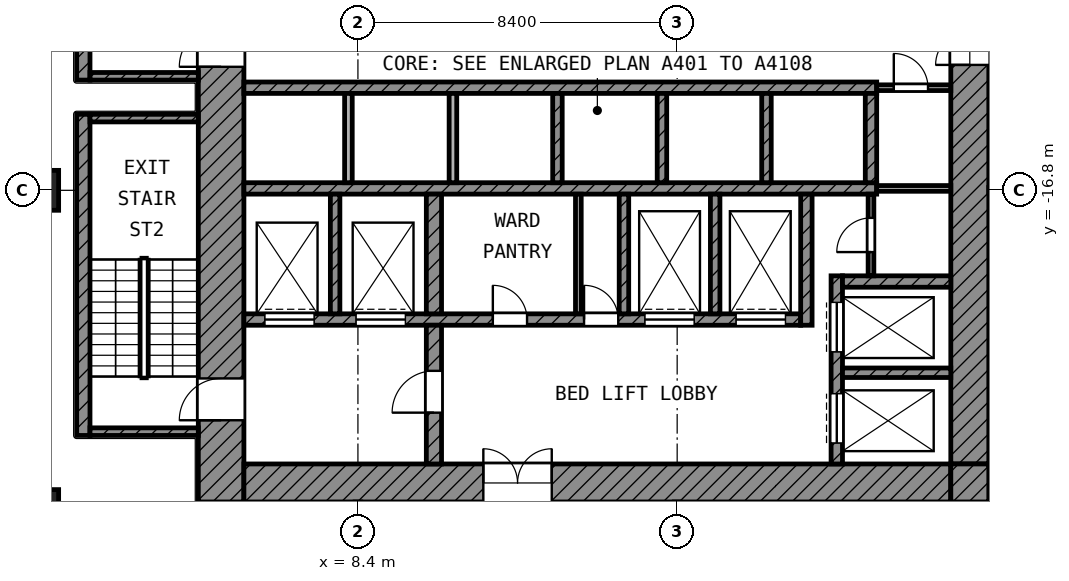
"""IFC4 building model, lengths in metres.
Left out: names, types, materials, properties, quantities, classifications, styles, units other than length and angle.
Written with IfcOpenShell. Run it as: python <this file> out.ifc"""

import sys

from ifc_helpers import new_model, si_unit, direction, frame, frame_2d, origin, origin_2d, place, context, subcontext, project, spatial, rectangle, extrude, element, fill, save


model = new_model("IFC4")
c1 = context("Model", 3, precision=1e-05, world=origin(), true_north=direction((0.0, 1.0)))
c2 = subcontext(c1, "Body", "Model", "MODEL_VIEW")
j1 = project(units=[si_unit("LENGTHUNIT", "METRE"), si_unit("PLANEANGLEUNIT", "RADIAN")], contexts=[c1])
p1 = place(None, origin())
s1 = spatial("IfcSite", under=j1, at=p1, CompositionType="ELEMENT")
p2 = place(p1, origin())
s2 = spatial("IfcBuilding", under=s1, at=p2, CompositionType="ELEMENT")
p3 = place(p2, frame((0.0, 0.0, 136.6)))
s3 = spatial("IfcBuildingStorey", under=s2, at=p3, CompositionType="ELEMENT", Elevation=136.6)
for number, where, z_axis, x_axis in (
    (1, (0.0, -16.8, 0.0), (0.0, 0.0, 1.0), (1.0, 0.0, 0.0)),
    (2, (0.0, -25.2, 0.0), (0.0, 0.0, 1.0), (1.0, 0.0, 0.0)),
):
    element("IfcColumn", number, at=place(p3, frame(where, z_axis=z_axis, x_axis=x_axis)), inside=s3, PredefinedType="COLUMN", context=c2, shape_type="SweptSolid", body=[
        extrude(rectangle(XDim=1.05, YDim=1.05, at=origin_2d()), origin(), (0.0, 0.0, 1.0), 4.2),
    ])
p4 = place(p3, frame((4.8, -25.0, 0.0), z_axis=(0.0, 0.0, 1.0), x_axis=(0.0, 1.0, 0.0)))
e3 = element("IfcWall", 3, at=p4, inside=s3, PredefinedType="SHEAR", context=c2, shape_type="SweptSolid", body=[
    extrude(rectangle(XDim=19.6, YDim=1.2, at=frame_2d((9.8, 0.0))), origin(), (0.0, 0.0, 1.0), 3.6),
])
p5 = place(p4, frame((11.45, 0.0, 0.0)))
e4 = element("IfcOpeningElement", 4, at=p5, cuts=e3, PredefinedType="OPENING", context=c2, shape_type="SweptSolid", body=[
    extrude(rectangle(XDim=1.1, YDim=2.1, at=frame_2d((0.55, 1.05))), frame((0.0, 0.61, 0.0), z_axis=(0.0, -1.0, 0.0), x_axis=(1.0, 0.0, 0.0)), (0.0, 0.0, 1.0), 1.22),
])
p6 = place(p4, frame((2.15, 0.0, 0.0)))
e5 = element("IfcOpeningElement", 5, at=p6, cuts=e3, PredefinedType="OPENING", context=c2, shape_type="SweptSolid", body=[
    extrude(rectangle(XDim=1.1, YDim=2.1, at=frame_2d((0.55, 1.05))), frame((0.0, 0.61, 0.0), z_axis=(0.0, -1.0, 0.0), x_axis=(1.0, 0.0, 0.0)), (0.0, 0.0, 1.0), 1.22),
])
p7 = place(p3, frame((24.5, -24.0, 0.0), z_axis=(0.0, 0.0, 1.0), x_axis=(0.0, 1.0, 0.0)))
e6 = element("IfcWall", 6, at=p7, inside=s3, PredefinedType="SHEAR", context=c2, shape_type="SweptSolid", body=[
    extrude(rectangle(XDim=18.6, YDim=1.0, at=frame_2d((9.3, 0.0))), origin(), (0.0, 0.0, 1.0), 3.6),
])
p8 = place(p7, frame((10.5, 0.0, 0.0)))
e7 = element("IfcOpeningElement", 7, at=p8, cuts=e6, PredefinedType="OPENING", context=c2, shape_type="SweptSolid", body=[
    extrude(rectangle(XDim=1.8, YDim=2.1, at=frame_2d((0.9, 1.05))), frame((0.0, 0.51, 0.0), z_axis=(0.0, -1.0, 0.0), x_axis=(1.0, 0.0, 0.0)), (0.0, 0.0, 1.0), 1.02),
])
p9 = place(p3, frame((5.4, -24.5, 0.0), z_axis=(0.0, 0.0, 1.0), x_axis=(1.0, 0.0, 0.0)))
e8 = element("IfcWall", 8, at=p9, inside=s3, PredefinedType="SHEAR", context=c2, shape_type="SweptSolid", body=[
    extrude(rectangle(XDim=18.6, YDim=1.0, at=frame_2d((9.3, 0.0))), origin(), (0.0, 0.0, 1.0), 3.6),
])
p10 = place(p9, frame((6.3, 0.0, 0.0)))
e9 = element("IfcOpeningElement", 9, at=p10, cuts=e8, PredefinedType="OPENING", context=c2, shape_type="SweptSolid", body=[
    extrude(rectangle(XDim=1.8, YDim=2.1, at=frame_2d((0.9, 1.05))), frame((0.0, 0.51, 0.0), z_axis=(0.0, -1.0, 0.0), x_axis=(1.0, 0.0, 0.0)), (0.0, 0.0, 1.0), 1.02),
])
p11 = place(p3, frame((24.5, -25.0, 0.0), z_axis=(0.0, 0.0, 1.0), x_axis=(0.0, 1.0, 0.0)))
e10 = element("IfcWall", 10, at=p11, inside=s3, PredefinedType="SHEAR", context=c2, shape_type="SweptSolid", body=[
    extrude(rectangle(XDim=1.0, YDim=1.0, at=frame_2d((0.5, 0.0))), origin(), (0.0, 0.0, 1.0), 3.6),
])
for number, where, z_axis, x_axis in (
    (11, (5.4, -14.1, 0.0), (0.0, 0.0, 1.0), (1.0, 0.0, 0.0)),
    (12, (5.4, -16.75, 0.0), (0.0, 0.0, 1.0), (1.0, 0.0, 0.0)),
):
    element("IfcWall", number, at=place(p3, frame(where, z_axis=z_axis, x_axis=x_axis)), inside=s3, PredefinedType="SHEAR", context=c2, shape_type="SweptSolid", body=[
        extrude(rectangle(XDim=16.65, YDim=0.3, at=frame_2d((8.325, 0.0))), origin(), (0.0, 0.0, 1.0), 3.6),
    ])
p12 = place(p3, frame((5.4, -20.2, 0.0), z_axis=(0.0, 0.0, 1.0), x_axis=(1.0, 0.0, 0.0)))
e13 = element("IfcWall", 13, at=p12, inside=s3, PredefinedType="SHEAR", context=c2, shape_type="SweptSolid", body=[
    extrude(rectangle(XDim=14.65, YDim=0.3, at=frame_2d((7.325, 0.0))), origin(), (0.0, 0.0, 1.0), 3.6),
])
p13 = place(p12, frame((10.55, 0.0, 0.0)))
e14 = element("IfcOpeningElement", 14, at=p13, cuts=e13, PredefinedType="OPENING", context=c2, shape_type="SweptSolid", body=[
    extrude(rectangle(XDim=1.3, YDim=2.1, at=frame_2d((0.65, 1.05))), frame((0.0, 0.16, 0.0), z_axis=(0.0, -1.0, 0.0), x_axis=(1.0, 0.0, 0.0)), (0.0, 0.0, 1.0), 0.32),
])
p14 = place(p12, frame((12.95, 0.0, 0.0)))
e15 = element("IfcOpeningElement", 15, at=p14, cuts=e13, PredefinedType="OPENING", context=c2, shape_type="SweptSolid", body=[
    extrude(rectangle(XDim=1.3, YDim=2.1, at=frame_2d((0.65, 1.05))), frame((0.0, 0.16, 0.0), z_axis=(0.0, -1.0, 0.0), x_axis=(1.0, 0.0, 0.0)), (0.0, 0.0, 1.0), 0.32),
])
p15 = place(p12, frame((0.55, 0.0, 0.0)))
e16 = element("IfcOpeningElement", 16, at=p15, cuts=e13, PredefinedType="OPENING", context=c2, shape_type="SweptSolid", body=[
    extrude(rectangle(XDim=1.3, YDim=2.1, at=frame_2d((0.65, 1.05))), frame((0.0, 0.16, 0.0), z_axis=(0.0, -1.0, 0.0), x_axis=(1.0, 0.0, 0.0)), (0.0, 0.0, 1.0), 0.32),
])
p16 = place(p12, frame((2.95, 0.0, 0.0)))
e17 = element("IfcOpeningElement", 17, at=p16, cuts=e13, PredefinedType="OPENING", context=c2, shape_type="SweptSolid", body=[
    extrude(rectangle(XDim=1.3, YDim=2.1, at=frame_2d((0.65, 1.05))), frame((0.0, 0.16, 0.0), z_axis=(0.0, -1.0, 0.0), x_axis=(1.0, 0.0, 0.0)), (0.0, 0.0, 1.0), 0.32),
])
p17 = place(p12, frame((6.55, 0.0, 0.0)))
e18 = element("IfcOpeningElement", 18, at=p17, cuts=e13, PredefinedType="OPENING", context=c2, shape_type="SweptSolid", body=[
    extrude(rectangle(XDim=0.9, YDim=2.1, at=frame_2d((0.45, 1.05))), frame((0.0, 0.16, 0.0), z_axis=(0.0, -1.0, 0.0), x_axis=(1.0, 0.0, 0.0)), (0.0, 0.0, 1.0), 0.32),
])
p18 = place(p12, frame((8.95, 0.0, 0.0)))
e19 = element("IfcOpeningElement", 19, at=p18, cuts=e13, PredefinedType="OPENING", context=c2, shape_type="SweptSolid", body=[
    extrude(rectangle(XDim=0.9, YDim=2.1, at=frame_2d((0.45, 1.05))), frame((0.0, 0.16, 0.0), z_axis=(0.0, -1.0, 0.0), x_axis=(1.0, 0.0, 0.0)), (0.0, 0.0, 1.0), 0.32),
])
p19 = place(p3, frame((10.4, -24.0, 0.0), z_axis=(0.0, 0.0, 1.0), x_axis=(0.0, 1.0, 0.0)))
e20 = element("IfcWall", 20, at=p19, inside=s3, PredefinedType="SHEAR", context=c2, shape_type="SweptSolid", body=[
    extrude(rectangle(XDim=3.65, YDim=0.4, at=frame_2d((1.825, 0.0))), origin(), (0.0, 0.0, 1.0), 3.6),
])
p20 = place(p19, frame((1.35, 0.0, 0.0)))
e21 = element("IfcOpeningElement", 21, at=p20, cuts=e20, PredefinedType="OPENING", context=c2, shape_type="SweptSolid", body=[
    extrude(rectangle(XDim=1.1, YDim=2.1, at=frame_2d((0.55, 1.05))), frame((0.0, 0.21, 0.0), z_axis=(0.0, -1.0, 0.0), x_axis=(1.0, 0.0, 0.0)), (0.0, 0.0, 1.0), 0.42),
])
p21 = place(p3, frame((10.4, -20.05, 0.0), z_axis=(0.0, 0.0, 1.0), x_axis=(0.0, 1.0, 0.0)))
e22 = element("IfcWall", 22, at=p21, inside=s3, PredefinedType="SHEAR", context=c2, shape_type="SweptSolid", body=[
    extrude(rectangle(XDim=3.15, YDim=0.4, at=frame_2d((1.575, 0.0))), origin(), (0.0, 0.0, 1.0), 3.6),
])
p22 = place(p3, frame((20.2, -20.35, 0.0), z_axis=(0.0, 0.0, 1.0), x_axis=(0.0, 1.0, 0.0)))
e23 = element("IfcWall", 23, at=p22, inside=s3, PredefinedType="SHEAR", context=c2, shape_type="SweptSolid", body=[
    extrude(rectangle(XDim=3.45, YDim=0.3, at=frame_2d((1.725, 0.0))), origin(), (0.0, 0.0, 1.0), 3.6),
])
p23 = place(p3, frame((21.9, -16.6, 0.0), z_axis=(0.0, 0.0, 1.0), x_axis=(0.0, 1.0, 0.0)))
e24 = element("IfcWall", 24, at=p23, inside=s3, PredefinedType="SHEAR", context=c2, shape_type="SweptSolid", body=[
    extrude(rectangle(XDim=2.35, YDim=0.3, at=frame_2d((1.175, 0.0))), origin(), (0.0, 0.0, 1.0), 3.6),
])
p24 = place(p3, frame((21.15, -19.2, 0.0), z_axis=(0.0, 0.0, 1.0), x_axis=(1.0, 0.0, 0.0)))
e25 = element("IfcWall", 25, at=p24, inside=s3, PredefinedType="SHEAR", context=c2, shape_type="SweptSolid", body=[
    extrude(rectangle(XDim=2.85, YDim=0.3, at=frame_2d((1.425, 0.0))), origin(), (0.0, 0.0, 1.0), 3.6),
])
p25 = place(p3, frame((21.0, -24.0, 0.0), z_axis=(0.0, 0.0, 1.0), x_axis=(0.0, 1.0, 0.0)))
e26 = element("IfcWall", 26, at=p25, inside=s3, PredefinedType="SHEAR", context=c2, shape_type="SweptSolid", body=[
    extrude(rectangle(XDim=4.95, YDim=0.3, at=frame_2d((2.475, 0.0))), origin(), (0.0, 0.0, 1.0), 3.6),
])
p26 = place(p25, frame((2.95, 0.0, 0.0)))
e27 = element("IfcOpeningElement", 27, at=p26, cuts=e26, PredefinedType="OPENING", context=c2, shape_type="SweptSolid", body=[
    extrude(rectangle(XDim=1.3, YDim=2.1, at=frame_2d((0.65, 1.05))), frame((0.0, 0.16, 0.0), z_axis=(0.0, -1.0, 0.0), x_axis=(1.0, 0.0, 0.0)), (0.0, 0.0, 1.0), 0.32),
])
p27 = place(p25, frame((0.55, 0.0, 0.0)))
e28 = element("IfcOpeningElement", 28, at=p27, cuts=e26, PredefinedType="OPENING", context=c2, shape_type="SweptSolid", body=[
    extrude(rectangle(XDim=1.3, YDim=2.1, at=frame_2d((0.65, 1.05))), frame((0.0, 0.16, 0.0), z_axis=(0.0, -1.0, 0.0), x_axis=(1.0, 0.0, 0.0)), (0.0, 0.0, 1.0), 0.32),
])
p28 = place(p3, frame((21.15, -21.6, 0.0), z_axis=(0.0, 0.0, 1.0), x_axis=(1.0, 0.0, 0.0)))
e29 = element("IfcWall", 29, at=p28, inside=s3, PredefinedType="SHEAR", context=c2, shape_type="SweptSolid", body=[
    extrude(rectangle(XDim=2.85, YDim=0.25, at=frame_2d((1.425, 0.0))), origin(), (0.0, 0.0, 1.0), 3.6),
])
for number, where, z_axis, x_axis in (
    (30, (7.8, -20.05, 0.0), (0.0, 0.0, 1.0), (0.0, 1.0, 0.0)),
    (31, (15.4, -20.05, 0.0), (0.0, 0.0, 1.0), (0.0, 1.0, 0.0)),
    (32, (17.8, -20.05, 0.0), (0.0, 0.0, 1.0), (0.0, 1.0, 0.0)),
):
    element("IfcWall", number, at=place(p3, frame(where, z_axis=z_axis, x_axis=x_axis)), inside=s3, PredefinedType="SHEAR", context=c2, shape_type="SweptSolid", body=[
        extrude(rectangle(XDim=3.15, YDim=0.25, at=frame_2d((1.575, 0.0))), origin(), (0.0, 0.0, 1.0), 3.6),
    ])
for number, where, z_axis, x_axis in (
    (33, (8.15, -16.6, 0.0), (0.0, 0.0, 1.0), (0.0, 1.0, 0.0)),
    (34, (10.9, -16.6, 0.0), (0.0, 0.0, 1.0), (0.0, 1.0, 0.0)),
):
    element("IfcWall", number, at=place(p3, frame(where, z_axis=z_axis, x_axis=x_axis)), inside=s3, PredefinedType="PARTITIONING", context=c2, shape_type="SweptSolid", body=[
        extrude(rectangle(XDim=2.35, YDim=0.2, at=frame_2d((1.175, 0.0))), origin(), (0.0, 0.0, 1.0), 3.6),
    ])
for number, where, z_axis, x_axis in (
    (35, (13.65, -16.6, 0.0), (0.0, 0.0, 1.0), (0.0, 1.0, 0.0)),
    (36, (16.4, -16.6, 0.0), (0.0, 0.0, 1.0), (0.0, 1.0, 0.0)),
    (37, (19.15, -16.6, 0.0), (0.0, 0.0, 1.0), (0.0, 1.0, 0.0)),
):
    element("IfcWall", number, at=place(p3, frame(where, z_axis=z_axis, x_axis=x_axis)), inside=s3, PredefinedType="SHEAR", context=c2, shape_type="SweptSolid", body=[
        extrude(rectangle(XDim=2.35, YDim=0.25, at=frame_2d((1.175, 0.0))), origin(), (0.0, 0.0, 1.0), 3.6),
    ])
p29 = place(p3, frame((21.9, -19.05, 0.0), z_axis=(0.0, 0.0, 1.0), x_axis=(0.0, 1.0, 0.0)))
e38 = element("IfcWall", 38, at=p29, inside=s3, PredefinedType="PARTITIONING", context=c2, shape_type="SweptSolid", body=[
    extrude(rectangle(XDim=2.15, YDim=0.15, at=frame_2d((1.075, 0.0))), origin(), (0.0, 0.0, 1.0), 3.6),
])
p30 = place(p29, frame((0.625, 0.0, 0.0)))
e39 = element("IfcOpeningElement", 39, at=p30, cuts=e38, PredefinedType="OPENING", context=c2, shape_type="SweptSolid", body=[
    extrude(rectangle(XDim=0.9, YDim=2.1, at=frame_2d((0.45, 1.05))), frame((0.0, 0.085, 0.0), z_axis=(0.0, -1.0, 0.0), x_axis=(1.0, 0.0, 0.0)), (0.0, 0.0, 1.0), 0.17),
])
p31 = place(p3, frame((22.05, -16.75, 0.0), z_axis=(0.0, 0.0, 1.0), x_axis=(1.0, 0.0, 0.0)))
e40 = element("IfcWall", 40, at=p31, inside=s3, PredefinedType="PARTITIONING", context=c2, shape_type="SweptSolid", body=[
    extrude(rectangle(XDim=1.95, YDim=0.15, at=frame_2d((0.975, 0.0))), origin(), (0.0, 0.0, 1.0), 3.6),
])
p32 = place(p3, frame((22.05, -14.1, 0.0), z_axis=(0.0, 0.0, 1.0), x_axis=(1.0, 0.0, 0.0)))
e41 = element("IfcWall", 41, at=p32, inside=s3, PredefinedType="PARTITIONING", context=c2, shape_type="SweptSolid", body=[
    extrude(rectangle(XDim=1.95, YDim=0.15, at=frame_2d((0.975, 0.0))), origin(), (0.0, 0.0, 1.0), 3.6),
])
p33 = place(p32, frame((0.45, 0.0, 0.0)))
e42 = element("IfcOpeningElement", 42, at=p33, cuts=e41, PredefinedType="OPENING", context=c2, shape_type="SweptSolid", body=[
    extrude(rectangle(XDim=0.9, YDim=2.1, at=frame_2d((0.45, 1.05))), frame((0.0, 0.085, 0.0), z_axis=(0.0, -1.0, 0.0), x_axis=(1.0, 0.0, 0.0)), (0.0, 0.0, 1.0), 0.17),
])
p34 = place(p3, frame((14.2, -20.05, 0.0), z_axis=(0.0, 0.0, 1.0), x_axis=(0.0, 1.0, 0.0)))
e43 = element("IfcWall", 43, at=p34, inside=s3, PredefinedType="PARTITIONING", context=c2, shape_type="SweptSolid", body=[
    extrude(rectangle(XDim=3.15, YDim=0.15, at=frame_2d((1.575, 0.0))), origin(), (0.0, 0.0, 1.0), 3.6),
])
p35 = place(p3, frame((1.175, -13.9, 0.0), z_axis=(0.0, 0.0, 1.0), x_axis=(0.0, 1.0, 0.0)))
e44 = element("IfcWall", 44, at=p35, inside=s3, PredefinedType="SHEAR", context=c2, shape_type="SweptSolid", body=[
    extrude(rectangle(XDim=8.45, YDim=0.35, at=frame_2d((4.225, 0.0))), origin(), (0.0, 0.0, 1.0), 3.6),
])
p36 = place(p3, frame((1.35, -13.8, 0.0), z_axis=(0.0, 0.0, 1.0), x_axis=(1.0, 0.0, 0.0)))
e45 = element("IfcWall", 45, at=p36, inside=s3, PredefinedType="SHEAR", context=c2, shape_type="SweptSolid", body=[
    extrude(rectangle(XDim=2.85, YDim=0.2, at=frame_2d((1.425, 0.0))), origin(), (0.0, 0.0, 1.0), 3.6),
])
p37 = place(p3, frame((1.175, -23.25, 0.0), z_axis=(0.0, 0.0, 1.0), x_axis=(0.0, 1.0, 0.0)))
e46 = element("IfcWall", 46, at=p37, inside=s3, PredefinedType="SHEAR", context=c2, shape_type="SweptSolid", body=[
    extrude(rectangle(XDim=8.45, YDim=0.35, at=frame_2d((4.225, 0.0))), origin(), (0.0, 0.0, 1.0), 3.6),
])
for number, where, z_axis, x_axis in (
    (47, (1.35, -14.9, 0.0), (0.0, 0.0, 1.0), (1.0, 0.0, 0.0)),
    (48, (1.35, -23.15, 0.0), (0.0, 0.0, 1.0), (1.0, 0.0, 0.0)),
):
    element("IfcWall", number, at=place(p3, frame(where, z_axis=z_axis, x_axis=x_axis)), inside=s3, PredefinedType="SHEAR", context=c2, shape_type="SweptSolid", body=[
        extrude(rectangle(XDim=2.85, YDim=0.2, at=frame_2d((1.425, 0.0))), origin(), (0.0, 0.0, 1.0), 3.6),
    ])
p38 = place(p3, frame((8.4, -31.782, 0.0), z_axis=(0.0, 0.0, 1.0), x_axis=(0.0, 1.0, 0.0)))
e49 = element("IfcWall", 49, at=p38, inside=s3, PredefinedType="PARTITIONING", context=c2, shape_type="SweptSolid", body=[
    extrude(rectangle(XDim=6.782, YDim=0.15, at=frame_2d((3.391, 0.0))), origin(), (0.0, 0.0, 1.0), 3.6),
])
p39 = place(p38, frame((4.182, 0.0, 0.0)))
e50 = element("IfcOpeningElement", 50, at=p39, cuts=e49, PredefinedType="OPENING", context=c2, shape_type="SweptSolid", body=[
    extrude(rectangle(XDim=0.9, YDim=2.1, at=frame_2d((0.45, 1.05))), frame((0.0, 0.085, 0.0), z_axis=(0.0, -1.0, 0.0), x_axis=(1.0, 0.0, 0.0)), (0.0, 0.0, 1.0), 0.17),
])
p40 = place(p26, origin())
e51 = element("IfcDoor", 51, at=p40, inside=s3, OperationType="DOUBLE_DOOR_SLIDING", PredefinedType="DOOR", context=c2, shape_type="SweptSolid", body=[
    extrude(rectangle(XDim=1.3, YDim=2.1, at=frame_2d((0.65, 1.05))), frame((0.0, 0.025, 0.0), z_axis=(0.0, -1.0, 0.0), x_axis=(1.0, 0.0, 0.0)), (0.0, 0.0, 1.0), 0.05),
])
fill(e27, e51)
p41 = place(p27, origin())
e52 = element("IfcDoor", 52, at=p41, inside=s3, OperationType="DOUBLE_DOOR_SLIDING", PredefinedType="DOOR", context=c2, shape_type="SweptSolid", body=[
    extrude(rectangle(XDim=1.3, YDim=2.1, at=frame_2d((0.65, 1.05))), frame((0.0, 0.025, 0.0), z_axis=(0.0, -1.0, 0.0), x_axis=(1.0, 0.0, 0.0)), (0.0, 0.0, 1.0), 0.05),
])
fill(e28, e52)
p42 = place(p13, origin())
e53 = element("IfcDoor", 53, at=p42, inside=s3, OperationType="DOUBLE_DOOR_SLIDING", PredefinedType="DOOR", context=c2, shape_type="SweptSolid", body=[
    extrude(rectangle(XDim=1.3, YDim=2.1, at=frame_2d((0.65, 1.05))), frame((0.0, 0.025, 0.0), z_axis=(0.0, -1.0, 0.0), x_axis=(1.0, 0.0, 0.0)), (0.0, 0.0, 1.0), 0.05),
])
fill(e14, e53)
p43 = place(p14, origin())
e54 = element("IfcDoor", 54, at=p43, inside=s3, OperationType="DOUBLE_DOOR_SLIDING", PredefinedType="DOOR", context=c2, shape_type="SweptSolid", body=[
    extrude(rectangle(XDim=1.3, YDim=2.1, at=frame_2d((0.65, 1.05))), frame((0.0, 0.025, 0.0), z_axis=(0.0, -1.0, 0.0), x_axis=(1.0, 0.0, 0.0)), (0.0, 0.0, 1.0), 0.05),
])
fill(e15, e54)
p44 = place(p15, origin())
e55 = element("IfcDoor", 55, at=p44, inside=s3, OperationType="DOUBLE_DOOR_SLIDING", PredefinedType="DOOR", context=c2, shape_type="SweptSolid", body=[
    extrude(rectangle(XDim=1.3, YDim=2.1, at=frame_2d((0.65, 1.05))), frame((0.0, 0.025, 0.0), z_axis=(0.0, -1.0, 0.0), x_axis=(1.0, 0.0, 0.0)), (0.0, 0.0, 1.0), 0.05),
])
fill(e16, e55)
p45 = place(p16, origin())
e56 = element("IfcDoor", 56, at=p45, inside=s3, OperationType="DOUBLE_DOOR_SLIDING", PredefinedType="DOOR", context=c2, shape_type="SweptSolid", body=[
    extrude(rectangle(XDim=1.3, YDim=2.1, at=frame_2d((0.65, 1.05))), frame((0.0, 0.025, 0.0), z_axis=(0.0, -1.0, 0.0), x_axis=(1.0, 0.0, 0.0)), (0.0, 0.0, 1.0), 0.05),
])
fill(e17, e56)
p46 = place(p5, origin())
e57 = element("IfcDoor", 57, at=p46, inside=s3, OperationType="SINGLE_SWING_LEFT", PredefinedType="DOOR", context=c2, shape_type="SweptSolid", body=[
    extrude(rectangle(XDim=1.1, YDim=2.1, at=frame_2d((0.55, 1.05))), frame((0.0, 0.025, 0.0), z_axis=(0.0, -1.0, 0.0), x_axis=(1.0, 0.0, 0.0)), (0.0, 0.0, 1.0), 0.05),
])
fill(e4, e57)
p47 = place(p6, origin())
e58 = element("IfcDoor", 58, at=p47, inside=s3, OperationType="SINGLE_SWING_LEFT", PredefinedType="DOOR", context=c2, shape_type="SweptSolid", body=[
    extrude(rectangle(XDim=1.1, YDim=2.1, at=frame_2d((0.55, 1.05))), frame((0.0, 0.025, 0.0), z_axis=(0.0, -1.0, 0.0), x_axis=(1.0, 0.0, 0.0)), (0.0, 0.0, 1.0), 0.05),
])
fill(e5, e58)
p48 = place(p20, origin())
e59 = element("IfcDoor", 59, at=p48, inside=s3, OperationType="SINGLE_SWING_LEFT", PredefinedType="DOOR", context=c2, shape_type="SweptSolid", body=[
    extrude(rectangle(XDim=1.1, YDim=2.1, at=frame_2d((0.55, 1.05))), frame((0.0, 0.025, 0.0), z_axis=(0.0, -1.0, 0.0), x_axis=(1.0, 0.0, 0.0)), (0.0, 0.0, 1.0), 0.05),
])
fill(e21, e59)
p49 = place(p8, origin())
e60 = element("IfcDoor", 60, at=p49, inside=s3, OperationType="DOUBLE_DOOR_SINGLE_SWING", PredefinedType="DOOR", context=c2, shape_type="SweptSolid", body=[
    extrude(rectangle(XDim=1.8, YDim=2.1, at=frame_2d((0.9, 1.05))), frame((0.0, 0.025, 0.0), z_axis=(0.0, -1.0, 0.0), x_axis=(1.0, 0.0, 0.0)), (0.0, 0.0, 1.0), 0.05),
])
fill(e7, e60)
p50 = place(p10, origin())
e61 = element("IfcDoor", 61, at=p50, inside=s3, OperationType="DOUBLE_DOOR_SINGLE_SWING", PredefinedType="DOOR", context=c2, shape_type="SweptSolid", body=[
    extrude(rectangle(XDim=1.8, YDim=2.1, at=frame_2d((0.9, 1.05))), frame((0.0, 0.025, 0.0), z_axis=(0.0, -1.0, 0.0), x_axis=(1.0, 0.0, 0.0)), (0.0, 0.0, 1.0), 0.05),
])
fill(e9, e61)
p51 = place(p33, origin())
e62 = element("IfcDoor", 62, at=p51, inside=s3, OperationType="SINGLE_SWING_LEFT", PredefinedType="DOOR", context=c2, shape_type="SweptSolid", body=[
    extrude(rectangle(XDim=0.9, YDim=2.1, at=frame_2d((0.45, 1.05))), frame((0.0, 0.025, 0.0), z_axis=(0.0, -1.0, 0.0), x_axis=(1.0, 0.0, 0.0)), (0.0, 0.0, 1.0), 0.05),
])
fill(e42, e62)
p52 = place(p30, origin())
e63 = element("IfcDoor", 63, at=p52, inside=s3, OperationType="SINGLE_SWING_LEFT", PredefinedType="DOOR", context=c2, shape_type="SweptSolid", body=[
    extrude(rectangle(XDim=0.9, YDim=2.1, at=frame_2d((0.45, 1.05))), frame((0.0, 0.025, 0.0), z_axis=(0.0, -1.0, 0.0), x_axis=(1.0, 0.0, 0.0)), (0.0, 0.0, 1.0), 0.05),
])
fill(e39, e63)
p53 = place(p17, origin())
e64 = element("IfcDoor", 64, at=p53, inside=s3, OperationType="SINGLE_SWING_LEFT", PredefinedType="DOOR", context=c2, shape_type="SweptSolid", body=[
    extrude(rectangle(XDim=0.9, YDim=2.1, at=frame_2d((0.45, 1.05))), frame((0.0, 0.025, 0.0), z_axis=(0.0, -1.0, 0.0), x_axis=(1.0, 0.0, 0.0)), (0.0, 0.0, 1.0), 0.05),
])
fill(e18, e64)
p54 = place(p18, origin())
e65 = element("IfcDoor", 65, at=p54, inside=s3, OperationType="SINGLE_SWING_LEFT", PredefinedType="DOOR", context=c2, shape_type="SweptSolid", body=[
    extrude(rectangle(XDim=0.9, YDim=2.1, at=frame_2d((0.45, 1.05))), frame((0.0, 0.025, 0.0), z_axis=(0.0, -1.0, 0.0), x_axis=(1.0, 0.0, 0.0)), (0.0, 0.0, 1.0), 0.05),
])
fill(e19, e65)
save(model, sys.argv[1])
